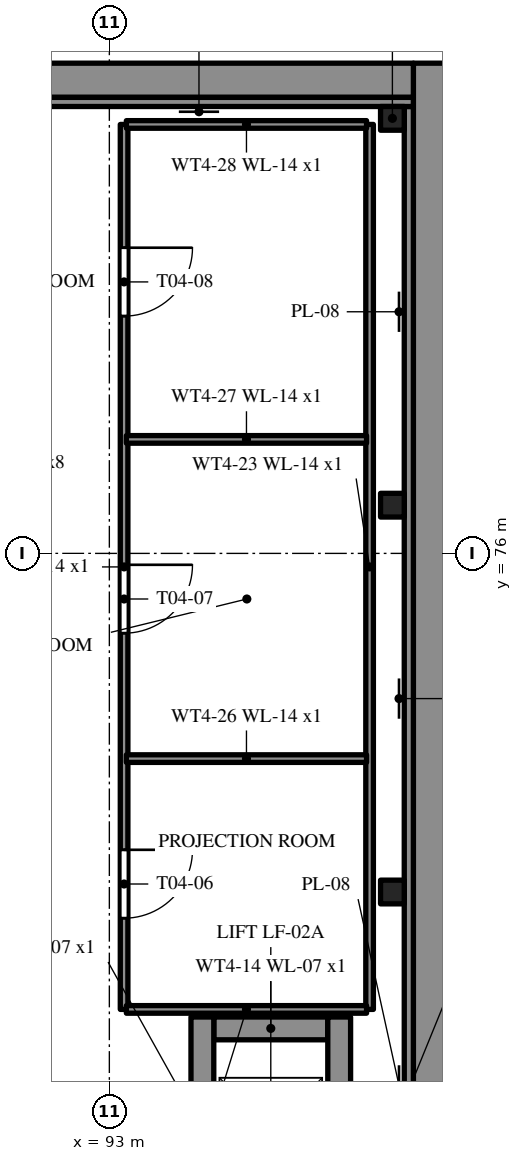
"""IFC4 building model, lengths in metres.
Left out: names, types, materials, properties, quantities, classifications, styles, units other than length and angle.
Written with IfcOpenShell. Run it as: python <this file> out.ifc"""

import sys

from ifc_helpers import new_model, si_unit, direction, frame, frame_2d, origin, origin_2d, place, context, subcontext, project, spatial, rectangle, i_section, extrude, element, fill, save


model = new_model("IFC4")
c1 = context("Model", 3, precision=1e-05, world=origin(), true_north=direction((0.0, 1.0)))
c2 = subcontext(c1, "Body", "Model", "MODEL_VIEW")
j1 = project(units=[si_unit("LENGTHUNIT", "METRE"), si_unit("PLANEANGLEUNIT", "RADIAN")], contexts=[c1])
p1 = place(None, origin())
s1 = spatial("IfcSite", under=j1, at=p1, CompositionType="ELEMENT")
p2 = place(p1, origin())
s2 = spatial("IfcBuilding", under=s1, at=p2, CompositionType="ELEMENT")
p3 = place(p2, frame((0.0, 0.0, 19.4)))
s3 = spatial("IfcBuildingStorey", under=s2, at=p3, CompositionType="ELEMENT", Elevation=19.4)
p4 = place(p3, frame((97.225, 55.4, 0.0), z_axis=(0.0, 0.0, 1.0), x_axis=(0.0, 1.0, 0.0)))
e1 = element("IfcWall", 1, at=p4, inside=s3, PredefinedType="SOLIDWALL", context=c2, shape_type="SweptSolid", body=[
    extrude(rectangle(XDim=27.05, YDim=0.45, at=frame_2d((13.525, 0.0))), origin(), (0.0, 0.0, 1.0), 4.6),
])
p5 = place(p3, frame((71.0, 82.225, 0.0), z_axis=(0.0, 0.0, 1.0), x_axis=(1.0, 0.0, 0.0)))
e2 = element("IfcWall", 2, at=p5, inside=s3, PredefinedType="SOLIDWALL", context=c2, shape_type="SweptSolid", body=[
    extrude(rectangle(XDim=26.0, YDim=0.45, at=frame_2d((13.0, 0.0))), origin(), (0.0, 0.0, 1.0), 4.6),
])
for number, where, z_axis, x_axis in (
    (3, (96.724, 71.545, 0.0), (0.0, 0.0, 1.0), (1.0, 0.0, 0.0)),
    (4, (96.724, 76.635, 0.0), (0.0, 0.0, 1.0), (1.0, 0.0, 0.0)),
    (5, (96.724, 81.724, 0.0), (0.0, 0.0, 1.0), (1.0, 0.0, 0.0)),
):
    element("IfcColumn", number, at=place(p3, frame(where, z_axis=z_axis, x_axis=x_axis)), inside=s3, PredefinedType="COLUMN", context=c2, shape_type="SweptSolid", body=[
        extrude(i_section(OverallWidth=0.312, OverallDepth=0.312, WebThickness=0.017, FlangeThickness=0.017, FilletRadius=0.016, at=origin_2d()), origin(), (0.0, 0.0, 1.0), 4.6),
    ])
p6 = place(p3, frame((95.874, 69.75, 0.0), z_axis=(0.0, 0.0, 1.0), x_axis=(-1.0, 0.0, 0.0)))
e6 = element("IfcWall", 6, at=p6, inside=s3, PredefinedType="SHEAR", context=c2, shape_type="SweptSolid", body=[
    extrude(rectangle(XDim=1.5, YDim=0.3, at=frame_2d((0.75, 0.0))), origin(), (0.0, 0.0, 1.0), 4.6),
])
p7 = place(p3, frame((94.224, 66.9, 0.0), z_axis=(0.0, 0.0, 1.0), x_axis=(0.0, 1.0, 0.0)))
e7 = element("IfcWall", 7, at=p7, inside=s3, PredefinedType="SHEAR", context=c2, shape_type="SweptSolid", body=[
    extrude(rectangle(XDim=3.0, YDim=0.3, at=frame_2d((1.5, 0.0))), origin(), (0.0, 0.0, 1.0), 4.6),
])
p8 = place(p7, frame((0.9, 0.0, 0.0)))
e8 = element("IfcOpeningElement", 8, at=p8, cuts=e7, PredefinedType="OPENING", context=c2, shape_type="SweptSolid", body=[
    extrude(rectangle(XDim=1.2, YDim=2.2, at=frame_2d((0.6, 1.1))), frame((0.0, 0.16, 0.0), z_axis=(0.0, -1.0, 0.0), x_axis=(1.0, 0.0, 0.0)), (0.0, 0.0, 1.0), 0.32),
])
p9 = place(p3, frame((96.024, 66.9, 0.0), z_axis=(0.0, 0.0, 1.0), x_axis=(0.0, 1.0, 0.0)))
e9 = element("IfcWall", 9, at=p9, inside=s3, PredefinedType="SHEAR", context=c2, shape_type="SweptSolid", body=[
    extrude(rectangle(XDim=3.0, YDim=0.3, at=frame_2d((1.5, 0.0))), origin(), (0.0, 0.0, 1.0), 4.6),
])
p10 = place(p3, frame((96.424, 70.0, 0.0), z_axis=(0.0, 0.0, 1.0), x_axis=(0.0, 1.0, 0.0)))
e10 = element("IfcWall", 10, at=p10, inside=s3, PredefinedType="PARTITIONING", context=c2, shape_type="SweptSolid", body=[
    extrude(rectangle(XDim=11.644, YDim=0.1, at=frame_2d((5.822, 0.0))), origin(), (0.0, 0.0, 1.0), 4.04),
])
p11 = place(p3, frame((93.194, 70.0, 0.0), z_axis=(0.0, 0.0, 1.0), x_axis=(0.0, 1.0, 0.0)))
e11 = element("IfcWall", 11, at=p11, inside=s3, PredefinedType="PARTITIONING", context=c2, shape_type="SweptSolid", body=[
    extrude(rectangle(XDim=11.644, YDim=0.1, at=frame_2d((5.822, 0.0))), origin(), (0.0, 0.0, 1.0), 4.04),
])
p12 = place(p11, frame((1.2, 0.0, 0.0)))
e12 = element("IfcOpeningElement", 12, at=p12, cuts=e11, PredefinedType="OPENING", context=c2, shape_type="SweptSolid", body=[
    extrude(rectangle(XDim=0.9, YDim=2.1, at=frame_2d((0.45, 1.05))), frame((0.0, 0.06, 0.0), z_axis=(0.0, -1.0, 0.0), x_axis=(1.0, 0.0, 0.0)), (0.0, 0.0, 1.0), 0.12),
])
p13 = place(p11, frame((4.95, 0.0, 0.0)))
e13 = element("IfcOpeningElement", 13, at=p13, cuts=e11, PredefinedType="OPENING", context=c2, shape_type="SweptSolid", body=[
    extrude(rectangle(XDim=0.9, YDim=2.1, at=frame_2d((0.45, 1.05))), frame((0.0, 0.06, 0.0), z_axis=(0.0, -1.0, 0.0), x_axis=(1.0, 0.0, 0.0)), (0.0, 0.0, 1.0), 0.12),
])
p14 = place(p11, frame((9.122, 0.0, 0.0)))
e14 = element("IfcOpeningElement", 14, at=p14, cuts=e11, PredefinedType="OPENING", context=c2, shape_type="SweptSolid", body=[
    extrude(rectangle(XDim=0.9, YDim=2.1, at=frame_2d((0.45, 1.05))), frame((0.0, 0.06, 0.0), z_axis=(0.0, -1.0, 0.0), x_axis=(1.0, 0.0, 0.0)), (0.0, 0.0, 1.0), 0.12),
])
for number, where, z_axis, x_axis in (
    (15, (96.384, 70.0, 0.0), (0.0, 0.0, 1.0), (-1.0, 0.0, 0.0)),
    (16, (96.384, 73.3, 0.0), (0.0, 0.0, 1.0), (-1.0, 0.0, 0.0)),
    (17, (96.384, 77.5, 0.0), (0.0, 0.0, 1.0), (-1.0, 0.0, 0.0)),
    (18, (96.384, 81.644, 0.0), (0.0, 0.0, 1.0), (-1.0, 0.0, 0.0)),
):
    element("IfcWall", number, at=place(p3, frame(where, z_axis=z_axis, x_axis=x_axis)), inside=s3, PredefinedType="PARTITIONING", context=c2, shape_type="SweptSolid", body=[
        extrude(rectangle(XDim=3.16, YDim=0.1, at=frame_2d((1.58, 0.0))), origin(), (0.0, 0.0, 1.0), 4.04),
    ])
p15 = place(p3, frame((96.94, 56.0, -1.54), z_axis=(0.0, 0.0, 1.0), x_axis=(0.0, 1.0, 0.0)))
e19 = element("IfcWall", 19, at=p15, inside=s3, PredefinedType="STANDARD", context=c2, shape_type="SweptSolid", body=[
    extrude(rectangle(XDim=25.88, YDim=0.12, at=frame_2d((12.94, 0.0))), origin(), (0.0, 0.0, 1.0), 6.14),
])
p16 = place(p3, frame((71.0, 81.94, -1.395), z_axis=(0.0, 0.0, 1.0), x_axis=(1.0, 0.0, 0.0)))
e20 = element("IfcWall", 20, at=p16, inside=s3, PredefinedType="STANDARD", context=c2, shape_type="SweptSolid", body=[
    extrude(rectangle(XDim=26.0, YDim=0.12, at=frame_2d((13.0, 0.0))), origin(), (0.0, 0.0, 1.0), 5.995),
])
p17 = place(p12, frame((0.9, 0.0, 0.0), z_axis=(0.0, 0.0, 1.0), x_axis=(-1.0, 0.0, 0.0)))
e21 = element("IfcDoor", 21, at=p17, inside=s3, OperationType="SINGLE_SWING_LEFT", PredefinedType="DOOR", context=c2, shape_type="SweptSolid", body=[
    extrude(rectangle(XDim=0.9, YDim=2.1, at=frame_2d((0.45, 1.05))), frame((0.0, 0.025, 0.0), z_axis=(0.0, -1.0, 0.0), x_axis=(1.0, 0.0, 0.0)), (0.0, 0.0, 1.0), 0.05),
])
fill(e12, e21)
p18 = place(p13, frame((0.9, 0.0, 0.0), z_axis=(0.0, 0.0, 1.0), x_axis=(-1.0, 0.0, 0.0)))
e22 = element("IfcDoor", 22, at=p18, inside=s3, OperationType="SINGLE_SWING_LEFT", PredefinedType="DOOR", context=c2, shape_type="SweptSolid", body=[
    extrude(rectangle(XDim=0.9, YDim=2.1, at=frame_2d((0.45, 1.05))), frame((0.0, 0.025, 0.0), z_axis=(0.0, -1.0, 0.0), x_axis=(1.0, 0.0, 0.0)), (0.0, 0.0, 1.0), 0.05),
])
fill(e13, e22)
p19 = place(p14, frame((0.9, 0.0, 0.0), z_axis=(0.0, 0.0, 1.0), x_axis=(-1.0, 0.0, 0.0)))
e23 = element("IfcDoor", 23, at=p19, inside=s3, OperationType="SINGLE_SWING_LEFT", PredefinedType="DOOR", context=c2, shape_type="SweptSolid", body=[
    extrude(rectangle(XDim=0.9, YDim=2.1, at=frame_2d((0.45, 1.05))), frame((0.0, 0.025, 0.0), z_axis=(0.0, -1.0, 0.0), x_axis=(1.0, 0.0, 0.0)), (0.0, 0.0, 1.0), 0.05),
])
fill(e14, e23)
save(model, sys.argv[1])
